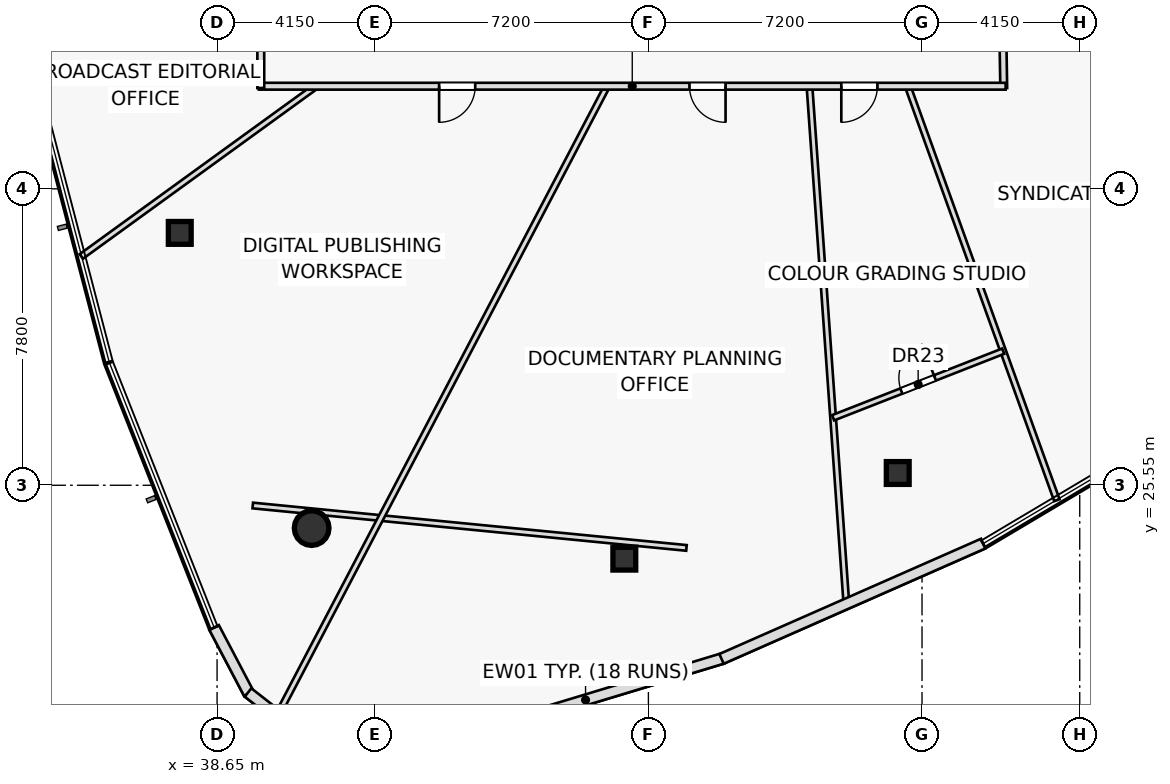
"""IFC4 building model, lengths in metres.
Left out: names, types, materials, properties, quantities, classifications, styles, units other than length and angle.
Written with IfcOpenShell. Run it as: python <this file> out.ifc"""

import sys

from ifc_helpers import new_model, si_unit, direction, frame, frame_2d, origin, origin_2d, place, context, subcontext, project, spatial, rectangle, hollow_rectangle, hollow_circle, extrude, element, fill, save


model = new_model("IFC4")
c1 = context("Model", 3, precision=1e-05, world=origin(), true_north=direction((0.0, 1.0)))
c2 = subcontext(c1, "Body", "Model", "MODEL_VIEW")
j1 = project(units=[si_unit("LENGTHUNIT", "METRE"), si_unit("PLANEANGLEUNIT", "RADIAN")], contexts=[c1])
p1 = place(None, origin())
s1 = spatial("IfcSite", under=j1, at=p1, CompositionType="ELEMENT")
p2 = place(p1, origin())
s2 = spatial("IfcBuilding", under=s1, at=p2, CompositionType="ELEMENT")
p3 = place(p2, frame((0.0, 0.0, 177.2)))
s3 = spatial("IfcBuildingStorey", under=s2, at=p3, CompositionType="ELEMENT", Elevation=177.2)
p4 = place(p3, frame((37.668, 32.19, 0.0), z_axis=(0.0, 0.0, 1.0), x_axis=(1.0, 0.0, 0.0)))
e1 = element("IfcColumn", 1, at=p4, inside=s3, PredefinedType="COLUMN", context=c2, shape_type="SweptSolid", body=[
    extrude(hollow_rectangle(XDim=0.6, YDim=0.6, WallThickness=0.036, at=origin_2d()), origin(), (0.0, 0.0, 1.0), 3.55),
])
p5 = place(p3, frame((41.139, 24.424, 0.0), z_axis=(0.0, 0.0, 1.0), x_axis=(1.0, 0.0, 0.0)))
e2 = element("IfcColumn", 2, at=p5, inside=s3, PredefinedType="COLUMN", context=c2, shape_type="SweptSolid", body=[
    extrude(hollow_circle(Radius=0.457, WallThickness=0.04, at=origin_2d()), origin(), (0.0, 0.0, 1.0), 3.55),
])
for number, where, z_axis, x_axis in (
    (3, (49.366, 23.619, 0.0), (0.0, 0.0, 1.0), (1.0, 0.0, 0.0)),
    (4, (56.561, 25.873, 0.0), (0.0, 0.0, 1.0), (1.0, 0.0, 0.0)),
):
    element("IfcColumn", number, at=place(p3, frame(where, z_axis=z_axis, x_axis=x_axis)), inside=s3, PredefinedType="COLUMN", context=c2, shape_type="SweptSolid", body=[
        extrude(hollow_rectangle(XDim=0.6, YDim=0.6, WallThickness=0.036, at=origin_2d()), origin(), (0.0, 0.0, 1.0), 3.55),
    ])
p6 = place(p3, frame((39.589, 25.018, 0.0), z_axis=(0.0, 0.0, 1.0), x_axis=(0.99524905582, -0.097361783517, 0.0)))
e5 = element("IfcWall", 5, at=p6, inside=s3, PredefinedType="PARTITIONING", context=c2, shape_type="SweptSolid", body=[
    extrude(rectangle(XDim=11.467, YDim=0.15, at=frame_2d((5.733, 0.0))), origin(), (0.0, 0.0, 1.0), 2.935),
])
p7 = place(p3, frame((41.256, 36.05, 0.0), z_axis=(0.0, 0.0, 1.0), x_axis=(-0.809606643128, -0.586972813172, 0.0)))
e6 = element("IfcWall", 6, at=p7, inside=s3, PredefinedType="PARTITIONING", context=c2, shape_type="SweptSolid", body=[
    extrude(rectangle(XDim=7.632, YDim=0.15, at=frame_2d((3.816, 0.0))), origin(), (0.0, 0.0, 1.0), 2.935),
])
p8 = place(p3, frame((48.911, 36.05, 0.0), z_axis=(0.0, 0.0, 1.0), x_axis=(-0.464058704917, -0.885804447037, 0.0)))
e7 = element("IfcWall", 7, at=p8, inside=s3, PredefinedType="PARTITIONING", context=c2, shape_type="SweptSolid", body=[
    extrude(rectangle(XDim=18.7, YDim=0.15, at=frame_2d((9.35, 0.0))), origin(), (0.0, 0.0, 1.0), 2.935),
])
p9 = place(p3, frame((54.238, 36.05, 0.0), z_axis=(0.0, 0.0, 1.0), x_axis=(0.071155639769, -0.997465224922, 0.0)))
e8 = element("IfcWall", 8, at=p9, inside=s3, PredefinedType="PARTITIONING", context=c2, shape_type="SweptSolid", body=[
    extrude(rectangle(XDim=13.666, YDim=0.15, at=frame_2d((6.833, 0.0))), origin(), (0.0, 0.0, 1.0), 3.025),
])
p10 = place(p3, frame((56.824, 36.05, 0.0), z_axis=(0.0, 0.0, 1.0), x_axis=(0.338939715527, -0.940808093736, 0.0)))
e9 = element("IfcWall", 9, at=p10, inside=s3, PredefinedType="PARTITIONING", context=c2, shape_type="SweptSolid", body=[
    extrude(rectangle(XDim=11.579, YDim=0.15, at=frame_2d((5.79, 0.0))), origin(), (0.0, 0.0, 1.0), 2.935),
])
p11 = place(p3, frame((59.267, 41.037, 0.0), z_axis=(0.0, 0.0, 1.0), x_axis=(0.819456500976, -0.573141381344, 0.0)))
e10 = element("IfcWall", 10, at=p11, inside=s3, PredefinedType="PARTITIONING", context=c2, shape_type="SweptSolid", body=[
    extrude(rectangle(XDim=14.756, YDim=0.15, at=frame_2d((7.378, 0.0))), origin(), (0.0, 0.0, 1.0), 2.935),
])
p12 = place(p11, frame((1.35, 0.0, 0.0)))
e11 = element("IfcOpeningElement", 11, at=p12, cuts=e10, PredefinedType="OPENING", context=c2, shape_type="SweptSolid", body=[
    extrude(rectangle(XDim=0.95, YDim=2.05, at=frame_2d((0.475, 1.025))), frame((0.0, 0.085, 0.0), z_axis=(0.0, -1.0, 0.0), x_axis=(1.0, 0.0, 0.0)), (0.0, 0.0, 1.0), 0.17),
])
p13 = place(p3, frame((54.861, 27.326, 0.0), z_axis=(0.0, 0.0, 1.0), x_axis=(0.931173811316, 0.364575552005, 0.0)))
e12 = element("IfcWall", 12, at=p13, inside=s3, PredefinedType="PARTITIONING", context=c2, shape_type="SweptSolid", body=[
    extrude(rectangle(XDim=4.806, YDim=0.15, at=frame_2d((2.403, 0.0))), origin(), (0.0, 0.0, 1.0), 2.935),
])
p14 = place(p13, frame((1.928, 0.0, 0.0)))
e13 = element("IfcOpeningElement", 13, at=p14, cuts=e12, PredefinedType="OPENING", context=c2, shape_type="SweptSolid", body=[
    extrude(rectangle(XDim=0.95, YDim=2.05, at=frame_2d((0.475, 1.025))), frame((0.0, 0.085, 0.0), z_axis=(0.0, -1.0, 0.0), x_axis=(1.0, 0.0, 0.0)), (0.0, 0.0, 1.0), 0.17),
])
p15 = place(p3, frame((59.266, 41.1, 0.0), z_axis=(0.0, 0.0, 1.0), x_axis=(0.016656377357, -0.999861272924, 0.0)))
e14 = element("IfcWall", 14, at=p15, inside=s3, PredefinedType="PARTITIONING", context=c2, shape_type="SweptSolid", body=[
    extrude(rectangle(XDim=5.101, YDim=0.18, at=frame_2d((2.55, 0.0))), origin(), (0.0, 0.0, 1.0), 2.935),
])
p16 = place(p15, frame((2.075, 0.0, 0.0)))
e15 = element("IfcOpeningElement", 15, at=p16, cuts=e14, PredefinedType="OPENING", context=c2, shape_type="SweptSolid", body=[
    extrude(rectangle(XDim=0.95, YDim=2.05, at=frame_2d((0.475, 1.025))), frame((0.0, 0.1, 0.0), z_axis=(0.0, -1.0, 0.0), x_axis=(1.0, 0.0, 0.0)), (0.0, 0.0, 1.0), 0.2),
])
p17 = place(p3, frame((59.4, 36.05, 0.0), z_axis=(0.0, 0.0, 1.0), x_axis=(-1.0, 0.0, 0.0)))
e16 = element("IfcWall", 16, at=p17, inside=s3, PredefinedType="PARTITIONING", context=c2, shape_type="SweptSolid", body=[
    extrude(rectangle(XDim=19.65, YDim=0.18, at=frame_2d((9.825, 0.0))), origin(), (0.0, 0.0, 1.0), 2.935),
])
p18 = place(p17, frame((3.374, 0.0, 0.0)))
e17 = element("IfcOpeningElement", 17, at=p18, cuts=e16, PredefinedType="OPENING", context=c2, shape_type="SweptSolid", body=[
    extrude(rectangle(XDim=0.95, YDim=2.05, at=frame_2d((0.475, 1.025))), frame((0.0, 0.1, 0.0), z_axis=(0.0, -1.0, 0.0), x_axis=(1.0, 0.0, 0.0)), (0.0, 0.0, 1.0), 0.2),
])
p19 = place(p17, frame((7.369, 0.0, 0.0)))
e18 = element("IfcOpeningElement", 18, at=p19, cuts=e16, PredefinedType="OPENING", context=c2, shape_type="SweptSolid", body=[
    extrude(rectangle(XDim=0.95, YDim=2.05, at=frame_2d((0.475, 1.025))), frame((0.0, 0.1, 0.0), z_axis=(0.0, -1.0, 0.0), x_axis=(1.0, 0.0, 0.0)), (0.0, 0.0, 1.0), 0.2),
])
p20 = place(p17, frame((13.957, 0.0, 0.0)))
e19 = element("IfcOpeningElement", 19, at=p20, cuts=e16, PredefinedType="OPENING", context=c2, shape_type="SweptSolid", body=[
    extrude(rectangle(XDim=0.95, YDim=2.05, at=frame_2d((0.475, 1.025))), frame((0.0, 0.1, 0.0), z_axis=(0.0, -1.0, 0.0), x_axis=(1.0, 0.0, 0.0)), (0.0, 0.0, 1.0), 0.2),
])
p21 = place(p3, frame((39.8, 36.0, 0.0), z_axis=(0.0, 0.0, 1.0), x_axis=(0.0, 1.0, 0.0)))
e20 = element("IfcWall", 20, at=p21, inside=s3, PredefinedType="PARTITIONING", context=c2, shape_type="SweptSolid", body=[
    extrude(rectangle(XDim=4.25, YDim=0.18, at=frame_2d((2.125, 0.0))), origin(), (0.0, 0.0, 1.0), 2.935),
])
p22 = place(p21, frame((1.65, 0.0, 0.0)))
e21 = element("IfcOpeningElement", 21, at=p22, cuts=e20, PredefinedType="OPENING", context=c2, shape_type="SweptSolid", body=[
    extrude(rectangle(XDim=0.95, YDim=2.05, at=frame_2d((0.475, 1.025))), frame((0.0, 0.1, 0.0), z_axis=(0.0, -1.0, 0.0), x_axis=(1.0, 0.0, 0.0)), (0.0, 0.0, 1.0), 0.2),
])
p23 = place(p3, frame((38.573, 21.807, 0.0), z_axis=(0.0, 0.0, 1.0), x_axis=(0.465530491216, -0.885031842223, 0.0)))
e22 = element("IfcWall", 22, at=p23, inside=s3, PredefinedType="STANDARD", context=c2, shape_type="SweptSolid", body=[
    extrude(rectangle(XDim=1.957, YDim=0.28, at=frame_2d((0.979, 0.0))), origin(), (0.0, 0.0, 1.0), 3.55),
])
p24 = place(p3, frame((39.465, 20.097, 0.0), z_axis=(0.0, 0.0, 1.0), x_axis=(0.788581401073, -0.61493038133, 0.0)))
e23 = element("IfcWall", 23, at=p24, inside=s3, PredefinedType="STANDARD", context=c2, shape_type="SweptSolid", body=[
    extrude(rectangle(XDim=1.946, YDim=0.28, at=frame_2d((0.973, 0.0))), origin(), (0.0, 0.0, 1.0), 3.55),
])
p25 = place(p3, frame((44.74, 18.812, 0.0), z_axis=(0.0, 0.0, 1.0), x_axis=(0.957204330877, 0.289412973015, 0.0)))
e24 = element("IfcWall", 24, at=p25, inside=s3, PredefinedType="STANDARD", context=c2, shape_type="SweptSolid", body=[
    extrude(rectangle(XDim=7.536, YDim=0.28, at=frame_2d((3.768, 0.0))), origin(), (0.0, 0.0, 1.0), 3.55),
])
p26 = place(p3, frame((51.925, 20.982, 0.0), z_axis=(0.0, 0.0, 1.0), x_axis=(0.915135500678, 0.403146394501, 0.0)))
e25 = element("IfcWall", 25, at=p26, inside=s3, PredefinedType="STANDARD", context=c2, shape_type="SweptSolid", body=[
    extrude(rectangle(XDim=7.523, YDim=0.28, at=frame_2d((3.762, 0.0))), origin(), (0.0, 0.0, 1.0), 3.55),
])
p27 = place(p14, origin())
e26 = element("IfcDoor", 26, at=p27, inside=s3, OperationType="SINGLE_SWING_RIGHT", PredefinedType="DOOR", context=c2, shape_type="SweptSolid", body=[
    extrude(rectangle(XDim=0.95, YDim=2.05, at=frame_2d((0.475, 1.025))), frame((0.0, 0.025, 0.0), z_axis=(0.0, -1.0, 0.0), x_axis=(1.0, 0.0, 0.0)), (0.0, 0.0, 1.0), 0.05),
])
fill(e13, e26)
p28 = place(p18, origin())
e27 = element("IfcDoor", 27, at=p28, inside=s3, OperationType="SINGLE_SWING_RIGHT", PredefinedType="DOOR", context=c2, shape_type="SweptSolid", body=[
    extrude(rectangle(XDim=0.95, YDim=2.05, at=frame_2d((0.475, 1.025))), frame((0.0, 0.025, 0.0), z_axis=(0.0, -1.0, 0.0), x_axis=(1.0, 0.0, 0.0)), (0.0, 0.0, 1.0), 0.05),
])
fill(e17, e27)
p29 = place(p19, origin())
e28 = element("IfcDoor", 28, at=p29, inside=s3, OperationType="SINGLE_SWING_LEFT", PredefinedType="DOOR", context=c2, shape_type="SweptSolid", body=[
    extrude(rectangle(XDim=0.95, YDim=2.05, at=frame_2d((0.475, 1.025))), frame((0.0, 0.025, 0.0), z_axis=(0.0, -1.0, 0.0), x_axis=(1.0, 0.0, 0.0)), (0.0, 0.0, 1.0), 0.05),
])
fill(e18, e28)
p30 = place(p20, origin())
e29 = element("IfcDoor", 29, at=p30, inside=s3, OperationType="SINGLE_SWING_RIGHT", PredefinedType="DOOR", context=c2, shape_type="SweptSolid", body=[
    extrude(rectangle(XDim=0.95, YDim=2.05, at=frame_2d((0.475, 1.025))), frame((0.0, 0.025, 0.0), z_axis=(0.0, -1.0, 0.0), x_axis=(1.0, 0.0, 0.0)), (0.0, 0.0, 1.0), 0.05),
])
fill(e19, e29)
save(model, sys.argv[1])
